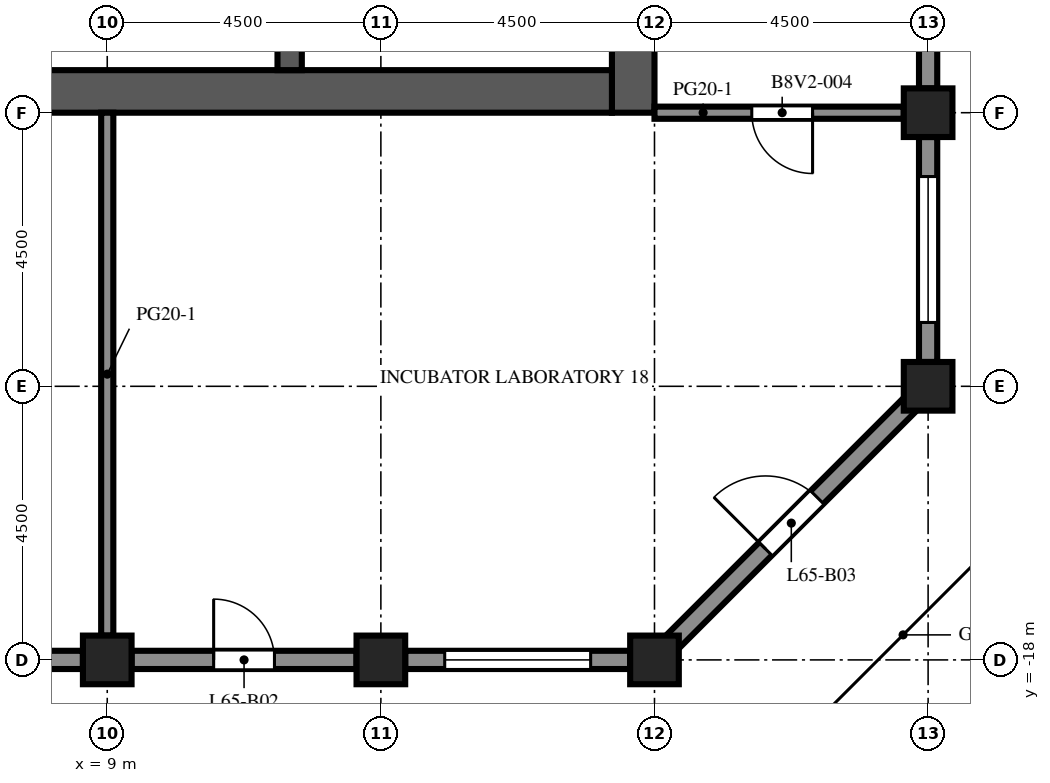
"""IFC4 building model, lengths in metres.
Left out: names, types, materials, properties, quantities, classifications, styles, units other than length and angle.
Written with IfcOpenShell. Run it as: python <this file> out.ifc"""

import sys

from ifc_helpers import new_model, si_unit, direction, frame, frame_2d, origin, origin_2d, place, context, subcontext, project, spatial, rectangle, extrude, element, fill, save


model = new_model("IFC4")
c1 = context("Model", 3, precision=1e-05, world=origin(), true_north=direction((0.0, 1.0)))
c2 = subcontext(c1, "Body", "Model", "MODEL_VIEW")
j1 = project(units=[si_unit("LENGTHUNIT", "METRE"), si_unit("PLANEANGLEUNIT", "RADIAN")], contexts=[c1])
p1 = place(None, origin())
s1 = spatial("IfcSite", under=j1, at=p1, CompositionType="ELEMENT")
p2 = place(p1, origin())
s2 = spatial("IfcBuilding", under=s1, at=p2, CompositionType="ELEMENT")
p3 = place(p2, frame((0.0, 0.0, 286.8)))
s3 = spatial("IfcBuildingStorey", under=s2, at=p3, CompositionType="ELEMENT", Elevation=286.8)
for number, where, z_axis, x_axis in (
    (1, (9.0, -18.0, 0.0), (0.0, 0.0, 1.0), (1.0, 0.0, 0.0)),
    (2, (13.5, -18.0, 0.0), (0.0, 0.0, 1.0), (1.0, 0.0, 0.0)),
    (3, (18.0, -18.0, 0.0), (0.0, 0.0, 1.0), (1.0, 0.0, 0.0)),
    (4, (22.5, -13.5, 0.0), (0.0, 0.0, 1.0), (1.0, 0.0, 0.0)),
    (5, (22.5, -9.0, 0.0), (0.0, 0.0, 1.0), (1.0, 0.0, 0.0)),
):
    element("IfcColumn", number, at=place(p3, frame(where, z_axis=z_axis, x_axis=x_axis)), inside=s3, PredefinedType="COLUMN", context=c2, shape_type="SweptSolid", body=[
        extrude(rectangle(XDim=0.8, YDim=0.8, at=origin_2d()), origin(), (0.0, 0.0, 1.0), 4.1),
    ])
p4 = place(p3, frame((17.65, -9.0, 0.0), z_axis=(0.0, 0.0, 1.0), x_axis=(0.0, 1.0, 0.0)))
e6 = element("IfcWall", 6, at=p4, inside=s3, PredefinedType="SHEAR", context=c2, shape_type="SweptSolid", body=[
    extrude(rectangle(XDim=27.5, YDim=0.7, at=frame_2d((13.75, 0.0))), origin(), (0.0, 0.0, 1.0), 4.1),
])
p5 = place(p4, frame((12.55, 0.0, 0.0)))
e7 = element("IfcOpeningElement", 7, at=p5, cuts=e6, PredefinedType="OPENING", context=c2, shape_type="SweptSolid", body=[
    extrude(rectangle(XDim=2.4, YDim=2.4, at=frame_2d((1.2, 1.2))), frame((0.0, 0.36, 0.0), z_axis=(0.0, -1.0, 0.0), x_axis=(1.0, 0.0, 0.0)), (0.0, 0.0, 1.0), 0.72),
])
p6 = place(p4, frame((6.825, 0.0, 0.0)))
e8 = element("IfcOpeningElement", 8, at=p6, cuts=e6, PredefinedType="OPENING", context=c2, shape_type="SweptSolid", body=[
    extrude(rectangle(XDim=1.2, YDim=2.1, at=frame_2d((0.6, 1.05))), frame((0.0, 0.36, 0.0), z_axis=(0.0, -1.0, 0.0), x_axis=(1.0, 0.0, 0.0)), (0.0, 0.0, 1.0), 0.72),
])
p7 = place(p4, frame((19.475, 0.0, 0.0)))
e9 = element("IfcOpeningElement", 9, at=p7, cuts=e6, PredefinedType="OPENING", context=c2, shape_type="SweptSolid", body=[
    extrude(rectangle(XDim=1.2, YDim=2.1, at=frame_2d((0.6, 1.05))), frame((0.0, 0.36, 0.0), z_axis=(0.0, -1.0, 0.0), x_axis=(1.0, 0.0, 0.0)), (0.0, 0.0, 1.0), 0.72),
])
p8 = place(p3, frame((6.7, -8.65, 0.0), z_axis=(0.0, 0.0, 1.0), x_axis=(1.0, 0.0, 0.0)))
e10 = element("IfcWall", 10, at=p8, inside=s3, PredefinedType="SHEAR", context=c2, shape_type="SweptSolid", body=[
    extrude(rectangle(XDim=10.6, YDim=0.7, at=frame_2d((5.3, 0.0))), origin(), (0.0, 0.0, 1.0), 4.1),
])
p9 = place(p3, frame((12.0, -8.3, 0.0), z_axis=(0.0, 0.0, 1.0), x_axis=(0.0, 1.0, 0.0)))
e11 = element("IfcWall", 11, at=p9, inside=s3, PredefinedType="SHEAR", context=c2, shape_type="SweptSolid", body=[
    extrude(rectangle(XDim=7.6, YDim=0.4, at=frame_2d((3.8, 0.0))), origin(), (0.0, 0.0, 1.0), 4.1),
])
p10 = place(p3, frame((8.6, -18.0, 0.0), z_axis=(0.0, 0.0, 1.0), x_axis=(-1.0, 0.0, 0.0)))
e12 = element("IfcWall", 12, at=p10, inside=s3, PredefinedType="SOLIDWALL", context=c2, shape_type="SweptSolid", body=[
    extrude(rectangle(XDim=3.7, YDim=0.3, at=frame_2d((1.85, 0.0))), origin(), (0.0, 0.0, 1.0), 2.85),
])
p11 = place(p10, frame((0.65, 0.0, 0.8)))
e13 = element("IfcOpeningElement", 13, at=p11, cuts=e12, PredefinedType="OPENING", context=c2, shape_type="SweptSolid", body=[
    extrude(rectangle(XDim=2.4, YDim=1.7, at=frame_2d((1.2, 0.85))), frame((0.0, 0.16, 0.0), z_axis=(0.0, -1.0, 0.0), x_axis=(1.0, 0.0, 0.0)), (0.0, 0.0, 1.0), 0.32),
])
p12 = place(p3, frame((13.1, -18.0, 0.0), z_axis=(0.0, 0.0, 1.0), x_axis=(-1.0, 0.0, 0.0)))
e14 = element("IfcWall", 14, at=p12, inside=s3, PredefinedType="SOLIDWALL", context=c2, shape_type="SweptSolid", body=[
    extrude(rectangle(XDim=3.7, YDim=0.3, at=frame_2d((1.85, 0.0))), origin(), (0.0, 0.0, 1.0), 2.85),
])
p13 = place(p12, frame((1.35, 0.0, 0.0)))
e15 = element("IfcOpeningElement", 15, at=p13, cuts=e14, PredefinedType="OPENING", context=c2, shape_type="SweptSolid", body=[
    extrude(rectangle(XDim=1.0, YDim=2.2, at=frame_2d((0.5, 1.1))), frame((0.0, 0.16, 0.0), z_axis=(0.0, -1.0, 0.0), x_axis=(1.0, 0.0, 0.0)), (0.0, 0.0, 1.0), 0.32),
])
p14 = place(p3, frame((17.6, -18.0, 0.0), z_axis=(0.0, 0.0, 1.0), x_axis=(-1.0, 0.0, 0.0)))
e16 = element("IfcWall", 16, at=p14, inside=s3, PredefinedType="SOLIDWALL", context=c2, shape_type="SweptSolid", body=[
    extrude(rectangle(XDim=3.7, YDim=0.3, at=frame_2d((1.85, 0.0))), origin(), (0.0, 0.0, 1.0), 2.85),
])
p15 = place(p14, frame((0.65, 0.0, 0.8)))
e17 = element("IfcOpeningElement", 17, at=p15, cuts=e16, PredefinedType="OPENING", context=c2, shape_type="SweptSolid", body=[
    extrude(rectangle(XDim=2.4, YDim=1.7, at=frame_2d((1.2, 0.85))), frame((0.0, 0.16, 0.0), z_axis=(0.0, -1.0, 0.0), x_axis=(1.0, 0.0, 0.0)), (0.0, 0.0, 1.0), 0.32),
])
p16 = place(p3, frame((22.206, -13.794, 0.0), z_axis=(0.0, 0.0, 1.0), x_axis=(-0.707106781187, -0.707106781187, 0.0)))
e18 = element("IfcWall", 18, at=p16, inside=s3, PredefinedType="SOLIDWALL", context=c2, shape_type="SweptSolid", body=[
    extrude(rectangle(XDim=5.532, YDim=0.3, at=frame_2d((2.766, 0.0))), origin(), (0.0, 0.0, 1.0), 2.85),
])
p17 = place(p16, frame((2.166, 0.0, 0.0)))
e19 = element("IfcOpeningElement", 19, at=p17, cuts=e18, PredefinedType="OPENING", context=c2, shape_type="SweptSolid", body=[
    extrude(rectangle(XDim=1.2, YDim=2.2, at=frame_2d((0.6, 1.1))), frame((0.0, 0.16, 0.0), z_axis=(0.0, -1.0, 0.0), x_axis=(1.0, 0.0, 0.0)), (0.0, 0.0, 1.0), 0.32),
])
p18 = place(p3, frame((22.5, -9.4, 0.0), z_axis=(0.0, 0.0, 1.0), x_axis=(0.0, -1.0, 0.0)))
e20 = element("IfcWall", 20, at=p18, inside=s3, PredefinedType="SOLIDWALL", context=c2, shape_type="SweptSolid", body=[
    extrude(rectangle(XDim=3.7, YDim=0.3, at=frame_2d((1.85, 0.0))), origin(), (0.0, 0.0, 1.0), 2.85),
])
p19 = place(p18, frame((0.65, 0.0, 0.8)))
e21 = element("IfcOpeningElement", 21, at=p19, cuts=e20, PredefinedType="OPENING", context=c2, shape_type="SweptSolid", body=[
    extrude(rectangle(XDim=2.4, YDim=1.7, at=frame_2d((1.2, 0.85))), frame((0.0, 0.16, 0.0), z_axis=(0.0, -1.0, 0.0), x_axis=(1.0, 0.0, 0.0)), (0.0, 0.0, 1.0), 0.32),
])
p20 = place(p3, frame((22.5, -4.9, 0.0), z_axis=(0.0, 0.0, 1.0), x_axis=(0.0, -1.0, 0.0)))
e22 = element("IfcWall", 22, at=p20, inside=s3, PredefinedType="SOLIDWALL", context=c2, shape_type="SweptSolid", body=[
    extrude(rectangle(XDim=3.7, YDim=0.3, at=frame_2d((1.85, 0.0))), origin(), (0.0, 0.0, 1.0), 2.85),
])
p21 = place(p20, frame((1.35, 0.0, 0.0)))
e23 = element("IfcOpeningElement", 23, at=p21, cuts=e22, PredefinedType="OPENING", context=c2, shape_type="SweptSolid", body=[
    extrude(rectangle(XDim=1.0, YDim=2.2, at=frame_2d((0.5, 1.1))), frame((0.0, 0.16, 0.0), z_axis=(0.0, -1.0, 0.0), x_axis=(1.0, 0.0, 0.0)), (0.0, 0.0, 1.0), 0.32),
])
p22 = place(p3, frame((8.2, -8.3, 0.0), z_axis=(0.0, 0.0, 1.0), x_axis=(0.0, 1.0, 0.0)))
e24 = element("IfcWall", 24, at=p22, inside=s3, PredefinedType="PARTITIONING", context=c2, shape_type="SweptSolid", body=[
    extrude(rectangle(XDim=2.28, YDim=0.1, at=frame_2d((1.14, 0.0))), origin(), (0.0, 0.0, 1.0), 3.65),
])
p23 = place(p22, frame((0.64, 0.0, 0.0)))
e25 = element("IfcOpeningElement", 25, at=p23, cuts=e24, PredefinedType="OPENING", context=c2, shape_type="SweptSolid", body=[
    extrude(rectangle(XDim=1.0, YDim=2.1, at=frame_2d((0.5, 1.05))), frame((0.0, 0.06, 0.0), z_axis=(0.0, -1.0, 0.0), x_axis=(1.0, 0.0, 0.0)), (0.0, 0.0, 1.0), 0.12),
])
p24 = place(p3, frame((9.0, -17.6, 0.0), z_axis=(0.0, 0.0, 1.0), x_axis=(0.0, 1.0, 0.0)))
e26 = element("IfcWall", 26, at=p24, inside=s3, PredefinedType="PARTITIONING", context=c2, shape_type="SweptSolid", body=[
    extrude(rectangle(XDim=8.6, YDim=0.2, at=frame_2d((4.3, 0.0))), origin(), (0.0, 0.0, 1.0), 3.65),
])
p25 = place(p3, frame((22.1, -9.0, 0.0), z_axis=(0.0, 0.0, 1.0), x_axis=(-1.0, 0.0, 0.0)))
e27 = element("IfcWall", 27, at=p25, inside=s3, PredefinedType="PARTITIONING", context=c2, shape_type="SweptSolid", body=[
    extrude(rectangle(XDim=4.1, YDim=0.2, at=frame_2d((2.05, 0.0))), origin(), (0.0, 0.0, 1.0), 3.65),
])
p26 = place(p25, frame((1.5, 0.0, 0.0)))
e28 = element("IfcOpeningElement", 28, at=p26, cuts=e27, PredefinedType="OPENING", context=c2, shape_type="SweptSolid", body=[
    extrude(rectangle(XDim=1.0, YDim=2.1, at=frame_2d((0.5, 1.05))), frame((0.0, 0.11, 0.0), z_axis=(0.0, -1.0, 0.0), x_axis=(1.0, 0.0, 0.0)), (0.0, 0.0, 1.0), 0.22),
])
p27 = place(p13, origin())
e29 = element("IfcDoor", 29, at=p27, inside=s3, OperationType="SINGLE_SWING_RIGHT", PredefinedType="DOOR", context=c2, shape_type="SweptSolid", body=[
    extrude(rectangle(XDim=1.0, YDim=2.2, at=frame_2d((0.5, 1.1))), frame((0.0, 0.025, 0.0), z_axis=(0.0, -1.0, 0.0), x_axis=(1.0, 0.0, 0.0)), (0.0, 0.0, 1.0), 0.05),
])
fill(e15, e29)
p28 = place(p15, origin())
e30 = element("IfcWindow", 30, at=p28, inside=s3, PartitioningType="SINGLE_PANEL", PredefinedType="WINDOW", context=c2, shape_type="SweptSolid", body=[
    extrude(rectangle(XDim=2.4, YDim=1.7, at=frame_2d((1.2, 0.85))), frame((0.0, 0.03, 0.0), z_axis=(0.0, -1.0, 0.0), x_axis=(1.0, 0.0, 0.0)), (0.0, 0.0, 1.0), 0.06),
])
fill(e17, e30)
p29 = place(p17, origin())
e31 = element("IfcDoor", 31, at=p29, inside=s3, OperationType="SINGLE_SWING_RIGHT", PredefinedType="DOOR", context=c2, shape_type="SweptSolid", body=[
    extrude(rectangle(XDim=1.2, YDim=2.2, at=frame_2d((0.6, 1.1))), frame((0.0, 0.025, 0.0), z_axis=(0.0, -1.0, 0.0), x_axis=(1.0, 0.0, 0.0)), (0.0, 0.0, 1.0), 0.05),
])
fill(e19, e31)
p30 = place(p19, origin())
e32 = element("IfcWindow", 32, at=p30, inside=s3, PartitioningType="SINGLE_PANEL", PredefinedType="WINDOW", context=c2, shape_type="SweptSolid", body=[
    extrude(rectangle(XDim=2.4, YDim=1.7, at=frame_2d((1.2, 0.85))), frame((0.0, 0.03, 0.0), z_axis=(0.0, -1.0, 0.0), x_axis=(1.0, 0.0, 0.0)), (0.0, 0.0, 1.0), 0.06),
])
fill(e21, e32)
p31 = place(p26, origin())
e33 = element("IfcDoor", 33, at=p31, inside=s3, OperationType="SINGLE_SWING_LEFT", PredefinedType="DOOR", context=c2, shape_type="SweptSolid", body=[
    extrude(rectangle(XDim=1.0, YDim=2.1, at=frame_2d((0.5, 1.05))), frame((0.0, 0.025, 0.0), z_axis=(0.0, -1.0, 0.0), x_axis=(1.0, 0.0, 0.0)), (0.0, 0.0, 1.0), 0.05),
])
fill(e28, e33)
save(model, sys.argv[1])
